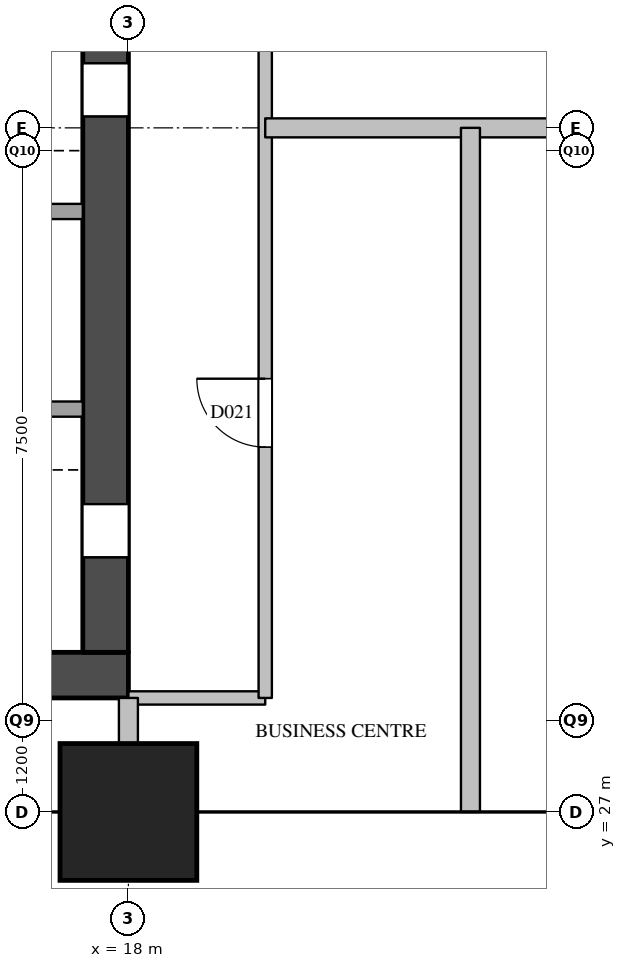
"""IFC4 building model, lengths in metres.
Left out: names, types, materials, properties, quantities, classifications, styles, units other than length and angle.
Written with IfcOpenShell. Run it as: python <this file> out.ifc"""

import sys

from ifc_helpers import new_model, si_unit, direction, frame, frame_2d, origin, origin_2d, place, context, subcontext, project, spatial, rectangle, extrude, element, fill, save


model = new_model("IFC4")
c1 = context("Model", 3, precision=1e-05, world=origin(), true_north=direction((0.0, 1.0)))
c2 = subcontext(c1, "Body", "Model", "MODEL_VIEW")
j1 = project(units=[si_unit("LENGTHUNIT", "METRE"), si_unit("PLANEANGLEUNIT", "RADIAN")], contexts=[c1])
p1 = place(None, origin())
s1 = spatial("IfcSite", under=j1, at=p1, CompositionType="ELEMENT")
p2 = place(p1, origin())
s2 = spatial("IfcBuilding", under=s1, at=p2, CompositionType="ELEMENT")
p3 = place(p2, frame((0.0, 0.0, 100.6)))
s3 = spatial("IfcBuildingStorey", under=s2, at=p3, CompositionType="ELEMENT", Elevation=100.6)
p4 = place(p3, frame((18.0, 27.0, 0.0), z_axis=(0.0, 0.0, 1.0), x_axis=(1.0, 0.0, 0.0)))
e1 = element("IfcColumn", 1, at=p4, inside=s3, PredefinedType="COLUMN", context=c2, shape_type="SweptSolid", body=[
    extrude(rectangle(XDim=1.8, YDim=1.8, at=origin_2d()), origin(), (0.0, 0.0, 1.0), 3.8),
])
p5 = place(p3, frame((5.6, 28.8, 0.0), z_axis=(0.0, 0.0, 1.0), x_axis=(1.0, 0.0, 0.0)))
e2 = element("IfcWall", 2, at=p5, inside=s3, PredefinedType="SHEAR", context=c2, shape_type="SweptSolid", body=[
    extrude(rectangle(XDim=12.4, YDim=0.6, at=frame_2d((6.2, 0.0))), origin(), (0.0, 0.0, 1.0), 3.5),
])
p6 = place(p5, frame((1.05, 0.0, 0.0)))
e3 = element("IfcOpeningElement", 3, at=p6, cuts=e2, PredefinedType="OPENING", context=c2, shape_type="SweptSolid", body=[
    extrude(rectangle(XDim=1.2, YDim=2.1, at=frame_2d((0.6, 1.05))), frame((0.0, 0.31, 0.0), z_axis=(0.0, -1.0, 0.0), x_axis=(1.0, 0.0, 0.0)), (0.0, 0.0, 1.0), 0.62),
])
p7 = place(p5, frame((5.25, 0.0, 0.0)))
e4 = element("IfcOpeningElement", 4, at=p7, cuts=e2, PredefinedType="OPENING", context=c2, shape_type="SweptSolid", body=[
    extrude(rectangle(XDim=1.2, YDim=2.1, at=frame_2d((0.6, 1.05))), frame((0.0, 0.31, 0.0), z_axis=(0.0, -1.0, 0.0), x_axis=(1.0, 0.0, 0.0)), (0.0, 0.0, 1.0), 0.62),
])
p8 = place(p5, frame((7.35, 0.0, 0.0)))
e5 = element("IfcOpeningElement", 5, at=p8, cuts=e2, PredefinedType="OPENING", context=c2, shape_type="SweptSolid", body=[
    extrude(rectangle(XDim=1.2, YDim=2.1, at=frame_2d((0.6, 1.05))), frame((0.0, 0.31, 0.0), z_axis=(0.0, -1.0, 0.0), x_axis=(1.0, 0.0, 0.0)), (0.0, 0.0, 1.0), 0.62),
])
p9 = place(p3, frame((17.7, 29.1, 0.0), z_axis=(0.0, 0.0, 1.0), x_axis=(0.0, 1.0, 0.0)))
e6 = element("IfcWall", 6, at=p9, inside=s3, PredefinedType="SHEAR", context=c2, shape_type="SweptSolid", body=[
    extrude(rectangle(XDim=20.3, YDim=0.6, at=frame_2d((10.15, 0.0))), origin(), (0.0, 0.0, 1.0), 3.5),
])
p10 = place(p9, frame((1.25, 0.0, 0.0)))
e7 = element("IfcOpeningElement", 7, at=p10, cuts=e6, PredefinedType="OPENING", context=c2, shape_type="SweptSolid", body=[
    extrude(rectangle(XDim=0.7, YDim=2.1, at=frame_2d((0.35, 1.05))), frame((0.0, 0.31, 0.0), z_axis=(0.0, -1.0, 0.0), x_axis=(1.0, 0.0, 0.0)), (0.0, 0.0, 1.0), 0.62),
])
p11 = place(p9, frame((7.05, 0.0, 0.0)))
e8 = element("IfcOpeningElement", 8, at=p11, cuts=e6, PredefinedType="OPENING", context=c2, shape_type="SweptSolid", body=[
    extrude(rectangle(XDim=0.7, YDim=2.1, at=frame_2d((0.35, 1.05))), frame((0.0, 0.31, 0.0), z_axis=(0.0, -1.0, 0.0), x_axis=(1.0, 0.0, 0.0)), (0.0, 0.0, 1.0), 0.62),
])
p12 = place(p3, frame((6.2, 32.3, 0.0), z_axis=(0.0, 0.0, 1.0), x_axis=(1.0, 0.0, 0.0)))
e9 = element("IfcWall", 9, at=p12, inside=s3, PredefinedType="SOLIDWALL", context=c2, shape_type="SweptSolid", body=[
    extrude(rectangle(XDim=11.2, YDim=0.2, at=frame_2d((5.6, 0.0))), origin(), (0.0, 0.0, 1.0), 3.5),
])
p13 = place(p12, frame((2.55, 0.0, 0.0)))
e10 = element("IfcOpeningElement", 10, at=p13, cuts=e9, PredefinedType="OPENING", context=c2, shape_type="SweptSolid", body=[
    extrude(rectangle(XDim=1.2, YDim=2.1, at=frame_2d((0.6, 1.05))), frame((0.0, 0.11, 0.0), z_axis=(0.0, -1.0, 0.0), x_axis=(1.0, 0.0, 0.0)), (0.0, 0.0, 1.0), 0.22),
])
p14 = place(p3, frame((6.2, 34.9, 0.0), z_axis=(0.0, 0.0, 1.0), x_axis=(1.0, 0.0, 0.0)))
e11 = element("IfcWall", 11, at=p14, inside=s3, PredefinedType="SOLIDWALL", context=c2, shape_type="SweptSolid", body=[
    extrude(rectangle(XDim=11.2, YDim=0.2, at=frame_2d((5.6, 0.0))), origin(), (0.0, 0.0, 1.0), 3.5),
])
p15 = place(p3, frame((18.0, 28.5, 0.0), z_axis=(0.0, 0.0, 1.0), x_axis=(1.0, 0.0, 0.0)))
e12 = element("IfcWall", 12, at=p15, inside=s3, PredefinedType="PARTITIONING", context=c2, shape_type="SweptSolid", body=[
    extrude(rectangle(XDim=1.8, YDim=0.175, at=frame_2d((0.9, 0.0))), origin(), (0.0, 0.0, 1.0), 3.5),
])
p16 = place(p3, frame((19.8, 28.5, 0.0), z_axis=(0.0, 0.0, 1.0), x_axis=(0.0, 1.0, 0.0)))
e13 = element("IfcWall", 13, at=p16, inside=s3, PredefinedType="PARTITIONING", context=c2, shape_type="SweptSolid", body=[
    extrude(rectangle(XDim=23.3, YDim=0.175, at=frame_2d((11.65, 0.0))), origin(), (0.0, 0.0, 1.0), 3.5),
])
p17 = place(p16, frame((3.3, 0.0, 0.0)))
e14 = element("IfcOpeningElement", 14, at=p17, cuts=e13, PredefinedType="OPENING", context=c2, shape_type="SweptSolid", body=[
    extrude(rectangle(XDim=0.9, YDim=2.1, at=frame_2d((0.45, 1.05))), frame((0.0, 0.097, 0.0), z_axis=(0.0, -1.0, 0.0), x_axis=(1.0, 0.0, 0.0)), (0.0, 0.0, 1.0), 0.195),
])
p18 = place(p16, frame((11.5, 0.0, 0.0)))
e15 = element("IfcOpeningElement", 15, at=p18, cuts=e13, PredefinedType="OPENING", context=c2, shape_type="SweptSolid", body=[
    extrude(rectangle(XDim=1.0, YDim=2.1, at=frame_2d((0.5, 1.05))), frame((0.0, 0.097, 0.0), z_axis=(0.0, -1.0, 0.0), x_axis=(1.0, 0.0, 0.0)), (0.0, 0.0, 1.0), 0.195),
])
p19 = place(p16, frame((19.45, 0.0, 0.0)))
e16 = element("IfcOpeningElement", 16, at=p19, cuts=e13, PredefinedType="OPENING", context=c2, shape_type="SweptSolid", body=[
    extrude(rectangle(XDim=0.9, YDim=2.1, at=frame_2d((0.45, 1.05))), frame((0.0, 0.097, 0.0), z_axis=(0.0, -1.0, 0.0), x_axis=(1.0, 0.0, 0.0)), (0.0, 0.0, 1.0), 0.195),
])
p20 = place(p3, frame((19.8, 36.0, 0.0), z_axis=(0.0, 0.0, 1.0), x_axis=(1.0, 0.0, 0.0)))
e17 = element("IfcWall", 17, at=p20, inside=s3, PredefinedType="PARTITIONING", context=c2, shape_type="SweptSolid", body=[
    extrude(rectangle(XDim=14.4, YDim=0.25, at=frame_2d((7.2, 0.0))), origin(), (0.0, 0.0, 1.0), 3.5),
])
p21 = place(p3, frame((18.0, 27.0, 0.0), z_axis=(0.0, 0.0, 1.0), x_axis=(0.0, 1.0, 0.0)))
e18 = element("IfcWall", 18, at=p21, inside=s3, PredefinedType="PARTITIONING", context=c2, shape_type="SweptSolid", body=[
    extrude(rectangle(XDim=1.5, YDim=0.25, at=frame_2d((0.75, 0.0))), origin(), (0.0, 0.0, 1.0), 3.5),
])
p22 = place(p3, frame((22.5, 27.0, 0.0), z_axis=(0.0, 0.0, 1.0), x_axis=(0.0, 1.0, 0.0)))
e19 = element("IfcWall", 19, at=p22, inside=s3, PredefinedType="PARTITIONING", context=c2, shape_type="SweptSolid", body=[
    extrude(rectangle(XDim=9.0, YDim=0.25, at=frame_2d((4.5, 0.0))), origin(), (0.0, 0.0, 1.0), 2.5),
])
p23 = place(p10, origin())
e20 = element("IfcDoor", 20, at=p23, inside=s3, OperationType="SINGLE_SWING_LEFT", PredefinedType="DOOR", context=c2, shape_type="SweptSolid", body=[
    extrude(rectangle(XDim=0.7, YDim=2.1, at=frame_2d((0.35, 1.05))), frame((0.0, 0.025, 0.0), z_axis=(0.0, -1.0, 0.0), x_axis=(1.0, 0.0, 0.0)), (0.0, 0.0, 1.0), 0.05),
])
fill(e7, e20)
p24 = place(p11, origin())
e21 = element("IfcDoor", 21, at=p24, inside=s3, OperationType="SINGLE_SWING_LEFT", PredefinedType="DOOR", context=c2, shape_type="SweptSolid", body=[
    extrude(rectangle(XDim=0.7, YDim=2.1, at=frame_2d((0.35, 1.05))), frame((0.0, 0.025, 0.0), z_axis=(0.0, -1.0, 0.0), x_axis=(1.0, 0.0, 0.0)), (0.0, 0.0, 1.0), 0.05),
])
fill(e8, e21)
p25 = place(p17, origin())
e22 = element("IfcDoor", 22, at=p25, inside=s3, OperationType="SINGLE_SWING_RIGHT", PredefinedType="DOOR", context=c2, shape_type="SweptSolid", body=[
    extrude(rectangle(XDim=0.9, YDim=2.1, at=frame_2d((0.45, 1.05))), frame((0.0, 0.025, 0.0), z_axis=(0.0, -1.0, 0.0), x_axis=(1.0, 0.0, 0.0)), (0.0, 0.0, 1.0), 0.05),
])
fill(e14, e22)
save(model, sys.argv[1])
